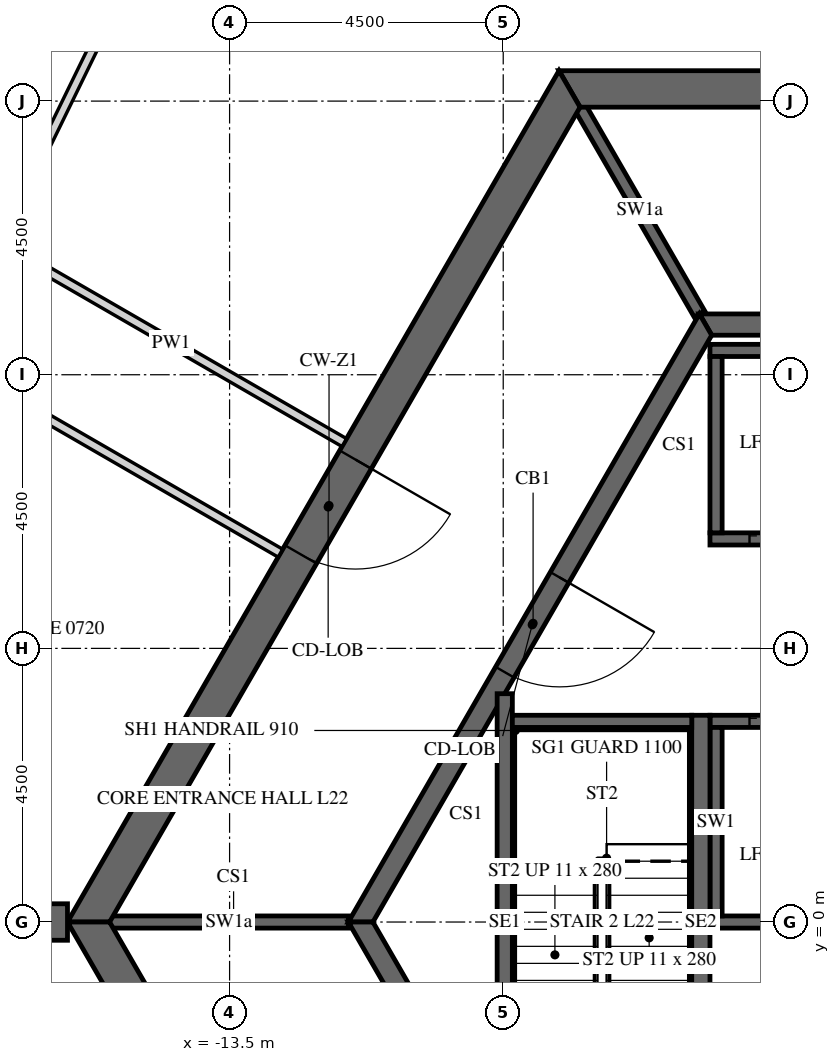
"""IFC4 building model, lengths in metres.
Left out: names, types, materials, properties, quantities, classifications, styles, units other than length and angle.
Written with IfcOpenShell. Run it as: python <this file> out.ifc"""

import sys

from ifc_helpers import new_model, si_unit, direction, frame, frame_2d, origin, place, context, subcontext, project, spatial, polyline, rectangle, outline, extrude, element, fill, save


model = new_model("IFC4")
c1 = context("Model", 3, precision=1e-05, world=origin(), true_north=direction((0.0, 1.0)))
c2 = subcontext(c1, "Body", "Model", "MODEL_VIEW")
j1 = project(units=[si_unit("LENGTHUNIT", "METRE"), si_unit("PLANEANGLEUNIT", "RADIAN")], contexts=[c1])
p1 = place(None, origin())
s1 = spatial("IfcSite", under=j1, at=p1, CompositionType="ELEMENT")
p2 = place(p1, origin())
s2 = spatial("IfcBuilding", under=s1, at=p2, CompositionType="ELEMENT")
p3 = place(p2, frame((0.0, 0.0, 99.9)))
s3 = spatial("IfcBuildingStorey", under=s2, at=p3, CompositionType="ELEMENT", Elevation=99.9)
p4 = place(p3, frame((-7.91, 13.7, -0.15), z_axis=(0.0, 0.0, 1.0), x_axis=(-0.499999880136, -0.866025472988, 0.0)))
e1 = element("IfcWall", 1, at=p4, inside=s3, PredefinedType="SHEAR", context=c2, shape_type="SweptSolid", body=[
    extrude(outline(polyline([(-0.173, -0.3), (15.993, -0.3), (15.646, 0.3), (0.173, 0.3), (-0.173, -0.3)])), origin(), (0.0, 0.0, 1.0), 3.9),
])
p5 = place(p4, frame((7.039, 0.0, 0.15)))
e2 = element("IfcOpeningElement", 2, at=p5, cuts=e1, PredefinedType="OPENING", context=c2, shape_type="SweptSolid", body=[
    extrude(rectangle(XDim=1.8, YDim=2.4, at=frame_2d((0.9, 1.2))), frame((0.0, 0.31, 0.0), z_axis=(0.0, -1.0, 0.0), x_axis=(1.0, 0.0, 0.0)), (0.0, 0.0, 1.0), 0.62),
])
p6 = place(p3, frame((-15.819, 0.0, -0.15), z_axis=(0.0, 0.0, 1.0), x_axis=(0.499999880136, -0.866025472988, 0.0)))
e3 = element("IfcWall", 3, at=p6, inside=s3, PredefinedType="SHEAR", context=c2, shape_type="SweptSolid", body=[
    extrude(outline(polyline([(-0.173, -0.3), (15.993, -0.3), (15.646, 0.3), (0.173, 0.3), (-0.173, -0.3)])), origin(), (0.0, 0.0, 1.0), 3.9),
])
p7 = place(p6, frame((6.981, 0.0, 0.15)))
e4 = element("IfcOpeningElement", 4, at=p7, cuts=e3, PredefinedType="OPENING", context=c2, shape_type="SweptSolid", body=[
    extrude(rectangle(XDim=1.8, YDim=2.4, at=frame_2d((0.9, 1.2))), frame((0.0, 0.31, 0.0), z_axis=(0.0, -1.0, 0.0), x_axis=(1.0, 0.0, 0.0)), (0.0, 0.0, 1.0), 0.62),
])
p8 = place(p3, frame((7.91, 13.7, -0.15), z_axis=(0.0, 0.0, 1.0), x_axis=(-1.0, 0.0, 0.0)))
e5 = element("IfcWall", 5, at=p8, inside=s3, PredefinedType="SHEAR", context=c2, shape_type="SweptSolid", body=[
    extrude(outline(polyline([(-0.173, -0.3), (15.993, -0.3), (15.646, 0.3), (0.173, 0.3), (-0.173, -0.3)])), origin(), (0.0, 0.0, 1.0), 3.9),
])
p9 = place(p8, frame((7.31, 0.0, 0.15)))
e6 = element("IfcOpeningElement", 6, at=p9, cuts=e5, PredefinedType="OPENING", context=c2, shape_type="SweptSolid", body=[
    extrude(rectangle(XDim=1.2, YDim=2.4, at=frame_2d((0.6, 1.2))), frame((0.0, 0.31, 0.0), z_axis=(0.0, -1.0, 0.0), x_axis=(1.0, 0.0, 0.0)), (0.0, 0.0, 1.0), 0.62),
])
p10 = place(p3, frame((-16.166, 0.0, -0.15), z_axis=(0.0, 0.0, 1.0), x_axis=(-1.0, 0.0, 0.0)))
e7 = element("IfcWall", 7, at=p10, inside=s3, PredefinedType="SHEAR", context=c2, shape_type="SweptSolid", body=[
    extrude(rectangle(XDim=16.509, YDim=0.6, at=frame_2d((8.254, 0.0))), origin(), (0.0, 0.0, 1.0), 3.9),
])
p11 = place(p10, frame((7.354, 0.0, 0.15)))
e8 = element("IfcOpeningElement", 8, at=p11, cuts=e7, PredefinedType="OPENING", context=c2, shape_type="SweptSolid", body=[
    extrude(rectangle(XDim=1.8, YDim=2.4, at=frame_2d((0.9, 1.2))), frame((0.0, 0.31, 0.0), z_axis=(0.0, -1.0, 0.0), x_axis=(1.0, 0.0, 0.0)), (0.0, 0.0, 1.0), 0.62),
])
p12 = place(p3, frame((-5.673, 9.825, -0.15), z_axis=(0.0, 0.0, 1.0), x_axis=(-0.499995046907, -0.866028263435, 0.0)))
e9 = element("IfcWall", 9, at=p12, inside=s3, PredefinedType="SHEAR", context=c2, shape_type="SweptSolid", body=[
    extrude(outline(polyline([(-0.101, -0.175), (11.446, -0.175), (11.244, 0.175), (0.101, 0.175), (-0.101, -0.175)])), origin(), (0.0, 0.0, 1.0), 3.9),
])
p13 = place(p12, frame((4.801, 0.0, 0.15)))
e10 = element("IfcOpeningElement", 10, at=p13, cuts=e9, PredefinedType="OPENING", context=c2, shape_type="SweptSolid", body=[
    extrude(rectangle(XDim=1.8, YDim=2.4, at=frame_2d((0.9, 1.2))), frame((0.0, 0.185, 0.0), z_axis=(0.0, -1.0, 0.0), x_axis=(1.0, 0.0, 0.0)), (0.0, 0.0, 1.0), 0.37),
])
p14 = place(p3, frame((-11.345, 0.0, -0.15), z_axis=(0.0, 0.0, 1.0), x_axis=(0.499995046907, -0.866028263435, 0.0)))
e11 = element("IfcWall", 11, at=p14, inside=s3, PredefinedType="SHEAR", context=c2, shape_type="SweptSolid", body=[
    extrude(outline(polyline([(-0.101, -0.175), (11.446, -0.175), (11.244, 0.175), (0.101, 0.175), (-0.101, -0.175)])), origin(), (0.0, 0.0, 1.0), 3.9),
])
p15 = place(p14, frame((4.744, 0.0, 0.15)))
e12 = element("IfcOpeningElement", 12, at=p15, cuts=e11, PredefinedType="OPENING", context=c2, shape_type="SweptSolid", body=[
    extrude(rectangle(XDim=1.8, YDim=2.4, at=frame_2d((0.9, 1.2))), frame((0.0, 0.185, 0.0), z_axis=(0.0, -1.0, 0.0), x_axis=(1.0, 0.0, 0.0)), (0.0, 0.0, 1.0), 0.37),
])
p16 = place(p3, frame((5.673, 9.825, -0.15), z_axis=(0.0, 0.0, 1.0), x_axis=(-1.0, 0.0, 0.0)))
e13 = element("IfcWall", 13, at=p16, inside=s3, PredefinedType="SHEAR", context=c2, shape_type="SweptSolid", body=[
    extrude(outline(polyline([(-0.101, -0.175), (11.446, -0.175), (11.244, 0.175), (0.101, 0.175), (-0.101, -0.175)])), origin(), (0.0, 0.0, 1.0), 3.9),
])
p17 = place(p3, frame((-5.6, 6.3, -0.25), z_axis=(0.0, 0.0, 1.0), x_axis=(1.0, 0.0, 0.0)))
e14 = element("IfcWall", 14, at=p17, inside=s3, PredefinedType="SHEAR", context=c2, shape_type="SweptSolid", body=[
    extrude(rectangle(XDim=11.2, YDim=0.2, at=frame_2d((5.6, 0.0))), origin(), (0.0, 0.0, 1.0), 3.9),
])
p18 = place(p17, frame((0.65, 0.0, 0.25)))
e15 = element("IfcOpeningElement", 15, at=p18, cuts=e14, PredefinedType="OPENING", context=c2, shape_type="SweptSolid", body=[
    extrude(rectangle(XDim=1.1, YDim=2.1, at=frame_2d((0.55, 1.05))), frame((0.0, 0.11, 0.0), z_axis=(0.0, -1.0, 0.0), x_axis=(1.0, 0.0, 0.0)), (0.0, 0.0, 1.0), 0.22),
])
p19 = place(p17, frame((2.85, 0.0, 0.25)))
e16 = element("IfcOpeningElement", 16, at=p19, cuts=e14, PredefinedType="OPENING", context=c2, shape_type="SweptSolid", body=[
    extrude(rectangle(XDim=1.1, YDim=2.1, at=frame_2d((0.55, 1.05))), frame((0.0, 0.11, 0.0), z_axis=(0.0, -1.0, 0.0), x_axis=(1.0, 0.0, 0.0)), (0.0, 0.0, 1.0), 0.22),
])
p20 = place(p17, frame((5.05, 0.0, 0.25)))
e17 = element("IfcOpeningElement", 17, at=p20, cuts=e14, PredefinedType="OPENING", context=c2, shape_type="SweptSolid", body=[
    extrude(rectangle(XDim=1.1, YDim=2.1, at=frame_2d((0.55, 1.05))), frame((0.0, 0.11, 0.0), z_axis=(0.0, -1.0, 0.0), x_axis=(1.0, 0.0, 0.0)), (0.0, 0.0, 1.0), 0.22),
])
p21 = place(p17, frame((7.25, 0.0, 0.25)))
e18 = element("IfcOpeningElement", 18, at=p21, cuts=e14, PredefinedType="OPENING", context=c2, shape_type="SweptSolid", body=[
    extrude(rectangle(XDim=1.1, YDim=2.1, at=frame_2d((0.55, 1.05))), frame((0.0, 0.11, 0.0), z_axis=(0.0, -1.0, 0.0), x_axis=(1.0, 0.0, 0.0)), (0.0, 0.0, 1.0), 0.22),
])
p22 = place(p17, frame((9.45, 0.0, 0.25)))
e19 = element("IfcOpeningElement", 19, at=p22, cuts=e14, PredefinedType="OPENING", context=c2, shape_type="SweptSolid", body=[
    extrude(rectangle(XDim=1.1, YDim=2.1, at=frame_2d((0.55, 1.05))), frame((0.0, 0.11, 0.0), z_axis=(0.0, -1.0, 0.0), x_axis=(1.0, 0.0, 0.0)), (0.0, 0.0, 1.0), 0.22),
])
p23 = place(p3, frame((-5.6, 9.4, -0.25), z_axis=(0.0, 0.0, 1.0), x_axis=(1.0, 0.0, 0.0)))
e20 = element("IfcWall", 20, at=p23, inside=s3, PredefinedType="SHEAR", context=c2, shape_type="SweptSolid", body=[
    extrude(rectangle(XDim=11.2, YDim=0.2, at=frame_2d((5.6, 0.0))), origin(), (0.0, 0.0, 1.0), 3.9),
])
p24 = place(p3, frame((-5.5, 6.4, -0.25), z_axis=(0.0, 0.0, 1.0), x_axis=(0.0, 1.0, 0.0)))
e21 = element("IfcWall", 21, at=p24, inside=s3, PredefinedType="SHEAR", context=c2, shape_type="SweptSolid", body=[
    extrude(rectangle(XDim=2.9, YDim=0.2, at=frame_2d((1.45, 0.0))), origin(), (0.0, 0.0, 1.0), 3.9),
])
p25 = place(p3, frame((-5.6, 3.3, -0.25), z_axis=(0.0, 0.0, 1.0), x_axis=(1.0, 0.0, 0.0)))
e22 = element("IfcWall", 22, at=p25, inside=s3, PredefinedType="SHEAR", context=c2, shape_type="SweptSolid", body=[
    extrude(rectangle(XDim=11.2, YDim=0.2, at=frame_2d((5.6, 0.0))), origin(), (0.0, 0.0, 1.0), 3.9),
])
p26 = place(p25, frame((0.65, 0.0, 0.25)))
e23 = element("IfcOpeningElement", 23, at=p26, cuts=e22, PredefinedType="OPENING", context=c2, shape_type="SweptSolid", body=[
    extrude(rectangle(XDim=1.1, YDim=2.1, at=frame_2d((0.55, 1.05))), frame((0.0, 0.11, 0.0), z_axis=(0.0, -1.0, 0.0), x_axis=(1.0, 0.0, 0.0)), (0.0, 0.0, 1.0), 0.22),
])
p27 = place(p25, frame((2.85, 0.0, 0.25)))
e24 = element("IfcOpeningElement", 24, at=p27, cuts=e22, PredefinedType="OPENING", context=c2, shape_type="SweptSolid", body=[
    extrude(rectangle(XDim=1.1, YDim=2.1, at=frame_2d((0.55, 1.05))), frame((0.0, 0.11, 0.0), z_axis=(0.0, -1.0, 0.0), x_axis=(1.0, 0.0, 0.0)), (0.0, 0.0, 1.0), 0.22),
])
p28 = place(p25, frame((5.05, 0.0, 0.25)))
e25 = element("IfcOpeningElement", 25, at=p28, cuts=e22, PredefinedType="OPENING", context=c2, shape_type="SweptSolid", body=[
    extrude(rectangle(XDim=1.1, YDim=2.1, at=frame_2d((0.55, 1.05))), frame((0.0, 0.11, 0.0), z_axis=(0.0, -1.0, 0.0), x_axis=(1.0, 0.0, 0.0)), (0.0, 0.0, 1.0), 0.22),
])
p29 = place(p25, frame((7.25, 0.0, 0.25)))
e26 = element("IfcOpeningElement", 26, at=p29, cuts=e22, PredefinedType="OPENING", context=c2, shape_type="SweptSolid", body=[
    extrude(rectangle(XDim=1.1, YDim=2.1, at=frame_2d((0.55, 1.05))), frame((0.0, 0.11, 0.0), z_axis=(0.0, -1.0, 0.0), x_axis=(1.0, 0.0, 0.0)), (0.0, 0.0, 1.0), 0.22),
])
p30 = place(p25, frame((9.45, 0.0, 0.25)))
e27 = element("IfcOpeningElement", 27, at=p30, cuts=e22, PredefinedType="OPENING", context=c2, shape_type="SweptSolid", body=[
    extrude(rectangle(XDim=1.1, YDim=2.1, at=frame_2d((0.55, 1.05))), frame((0.0, 0.11, 0.0), z_axis=(0.0, -1.0, 0.0), x_axis=(1.0, 0.0, 0.0)), (0.0, 0.0, 1.0), 0.22),
])
p31 = place(p3, frame((-5.6, 0.0, -0.25), z_axis=(0.0, 0.0, 1.0), x_axis=(1.0, 0.0, 0.0)))
e28 = element("IfcWall", 28, at=p31, inside=s3, PredefinedType="SHEAR", context=c2, shape_type="SweptSolid", body=[
    extrude(rectangle(XDim=11.2, YDim=0.2, at=frame_2d((5.6, 0.0))), origin(), (0.0, 0.0, 1.0), 3.9),
])
p32 = place(p3, frame((-5.5, 0.1, -0.25), z_axis=(0.0, 0.0, 1.0), x_axis=(0.0, 1.0, 0.0)))
e29 = element("IfcWall", 29, at=p32, inside=s3, PredefinedType="SHEAR", context=c2, shape_type="SweptSolid", body=[
    extrude(rectangle(XDim=3.1, YDim=0.2, at=frame_2d((1.55, 0.0))), origin(), (0.0, 0.0, 1.0), 3.9),
])
p33 = place(p3, frame((-5.773, 10.0, -0.15), z_axis=(0.0, 0.0, 1.0), x_axis=(-0.500038251005, 0.86600331843, 0.0)))
e30 = element("IfcWall", 30, at=p33, inside=s3, PredefinedType="SHEAR", context=c2, shape_type="SweptSolid", body=[
    extrude(rectangle(XDim=3.926, YDim=0.2, at=frame_2d((1.963, 0.0))), origin(), (0.0, 0.0, 1.0), 3.9),
])
p34 = place(p3, frame((-11.547, 0.0, -0.15), z_axis=(0.0, 0.0, 1.0), x_axis=(-1.0, 0.0, 0.0)))
e31 = element("IfcWall", 31, at=p34, inside=s3, PredefinedType="SHEAR", context=c2, shape_type="SweptSolid", body=[
    extrude(rectangle(XDim=3.926, YDim=0.2, at=frame_2d((1.963, 0.0))), origin(), (0.0, 0.0, 1.0), 3.9),
])
p35 = place(p3, frame((-5.75, -3.4, -0.25), z_axis=(0.0, 0.0, 1.0), x_axis=(0.0, 1.0, 0.0)))
e32 = element("IfcWall", 32, at=p35, inside=s3, PredefinedType="SHEAR", context=c2, shape_type="SweptSolid", body=[
    extrude(rectangle(XDim=6.8, YDim=0.3, at=frame_2d((3.4, 0.0))), origin(), (0.0, 0.0, 1.0), 3.9),
])
p36 = place(p3, frame((-8.975, -3.755, -0.25), z_axis=(0.0, 0.0, 1.0), x_axis=(0.0, 1.0, 0.0)))
e33 = element("IfcWall", 33, at=p36, inside=s3, PredefinedType="SHEAR", context=c2, shape_type="SweptSolid", body=[
    extrude(rectangle(XDim=7.51, YDim=0.25, at=frame_2d((3.755, 0.0))), origin(), (0.0, 0.0, 1.0), 3.9),
])
p37 = place(p3, frame((-8.85, 3.3, -0.25), z_axis=(0.0, 0.0, 1.0), x_axis=(1.0, 0.0, 0.0)))
e34 = element("IfcWall", 34, at=p37, inside=s3, PredefinedType="SHEAR", context=c2, shape_type="SweptSolid", body=[
    extrude(rectangle(XDim=2.95, YDim=0.2, at=frame_2d((1.475, 0.0))), origin(), (0.0, 0.0, 1.0), 3.9),
])
p38 = place(p3, frame((-13.94, 22.175, 0.0), z_axis=(0.0, 0.0, 1.0), x_axis=(-0.438373022655, -0.898793131376, 0.0)))
e35 = element("IfcWall", 35, at=p38, inside=s3, PredefinedType="PARTITIONING", context=c2, shape_type="SweptSolid", body=[
    extrude(rectangle(XDim=22.335, YDim=0.15, at=frame_2d((11.168, 0.0))), origin(), (0.0, 0.0, 1.0), 2.988),
])
p39 = place(p38, frame((3.363, 0.0, 0.0)))
e36 = element("IfcOpeningElement", 36, at=p39, cuts=e35, PredefinedType="OPENING", context=c2, shape_type="SweptSolid", body=[
    extrude(rectangle(XDim=1.0, YDim=2.1, at=frame_2d((0.5, 1.05))), frame((0.0, 0.085, 0.0), z_axis=(0.0, -1.0, 0.0), x_axis=(1.0, 0.0, 0.0)), (0.0, 0.0, 1.0), 0.17),
])
p40 = place(p38, frame((11.609, 0.0, 0.0)))
e37 = element("IfcOpeningElement", 37, at=p40, cuts=e35, PredefinedType="OPENING", context=c2, shape_type="SweptSolid", body=[
    extrude(rectangle(XDim=1.0, YDim=2.1, at=frame_2d((0.5, 1.05))), frame((0.0, 0.085, 0.0), z_axis=(0.0, -1.0, 0.0), x_axis=(1.0, 0.0, 0.0)), (0.0, 0.0, 1.0), 0.17),
])
p41 = place(p38, frame((19.872, 0.0, 0.0)))
e38 = element("IfcOpeningElement", 38, at=p41, cuts=e35, PredefinedType="OPENING", context=c2, shape_type="SweptSolid", body=[
    extrude(rectangle(XDim=1.0, YDim=2.1, at=frame_2d((0.5, 1.05))), frame((0.0, 0.085, 0.0), z_axis=(0.0, -1.0, 0.0), x_axis=(1.0, 0.0, 0.0)), (0.0, 0.0, 1.0), 0.17),
])
p42 = place(p3, frame((-11.614, 7.884, 0.0), z_axis=(0.0, 0.0, 1.0), x_axis=(-0.866025963225, 0.49999903102, 0.0)))
e39 = element("IfcWall", 39, at=p42, inside=s3, PredefinedType="PARTITIONING", context=c2, shape_type="SweptSolid", body=[
    extrude(rectangle(XDim=6.571, YDim=0.15, at=frame_2d((3.286, 0.0))), origin(), (0.0, 0.0, 1.0), 2.988),
])
p43 = place(p3, frame((-17.272, 11.238, 0.0), z_axis=(0.0, 0.0, 1.0), x_axis=(0.438369193793, 0.898794998836, 0.0)))
e40 = element("IfcWall", 40, at=p43, inside=s3, PredefinedType="PARTITIONING", context=c2, shape_type="SweptSolid", body=[
    extrude(rectangle(XDim=10.25, YDim=0.15, at=frame_2d((5.125, 0.0))), origin(), (0.0, 0.0, 1.0), 2.988),
])
p44 = place(p3, frame((-18.162, 9.24, 0.0), z_axis=(0.0, 0.0, 1.0), x_axis=(0.866026781814, -0.499997613175, 0.0)))
e41 = element("IfcWall", 41, at=p44, inside=s3, PredefinedType="PARTITIONING", context=c2, shape_type="SweptSolid", body=[
    extrude(rectangle(XDim=6.349, YDim=0.15, at=frame_2d((3.175, 0.0))), origin(), (0.0, 0.0, 1.0), 2.988),
])
p45 = place(p5, origin())
e42 = element("IfcDoor", 42, at=p45, inside=s3, OperationType="DOUBLE_DOOR_SINGLE_SWING", PredefinedType="DOOR", context=c2, shape_type="SweptSolid", body=[
    extrude(rectangle(XDim=1.8, YDim=2.4, at=frame_2d((0.9, 1.2))), frame((0.0, 0.025, 0.0), z_axis=(0.0, -1.0, 0.0), x_axis=(1.0, 0.0, 0.0)), (0.0, 0.0, 1.0), 0.05),
])
fill(e2, e42)
p46 = place(p13, origin())
e43 = element("IfcDoor", 43, at=p46, inside=s3, OperationType="DOUBLE_DOOR_SINGLE_SWING", PredefinedType="DOOR", context=c2, shape_type="SweptSolid", body=[
    extrude(rectangle(XDim=1.8, YDim=2.4, at=frame_2d((0.9, 1.2))), frame((0.0, 0.025, 0.0), z_axis=(0.0, -1.0, 0.0), x_axis=(1.0, 0.0, 0.0)), (0.0, 0.0, 1.0), 0.05),
])
fill(e10, e43)
p47 = place(p18, origin())
e44 = element("IfcDoor", 44, at=p47, inside=s3, OperationType="SLIDING_TO_LEFT", PredefinedType="DOOR", context=c2, shape_type="SweptSolid", body=[
    extrude(rectangle(XDim=1.1, YDim=2.1, at=frame_2d((0.55, 1.05))), frame((0.0, 0.025, 0.0), z_axis=(0.0, -1.0, 0.0), x_axis=(1.0, 0.0, 0.0)), (0.0, 0.0, 1.0), 0.05),
])
fill(e15, e44)
p48 = place(p26, origin())
e45 = element("IfcDoor", 45, at=p48, inside=s3, OperationType="SLIDING_TO_LEFT", PredefinedType="DOOR", context=c2, shape_type="SweptSolid", body=[
    extrude(rectangle(XDim=1.1, YDim=2.1, at=frame_2d((0.55, 1.05))), frame((0.0, 0.025, 0.0), z_axis=(0.0, -1.0, 0.0), x_axis=(1.0, 0.0, 0.0)), (0.0, 0.0, 1.0), 0.05),
])
fill(e23, e45)
save(model, sys.argv[1])
